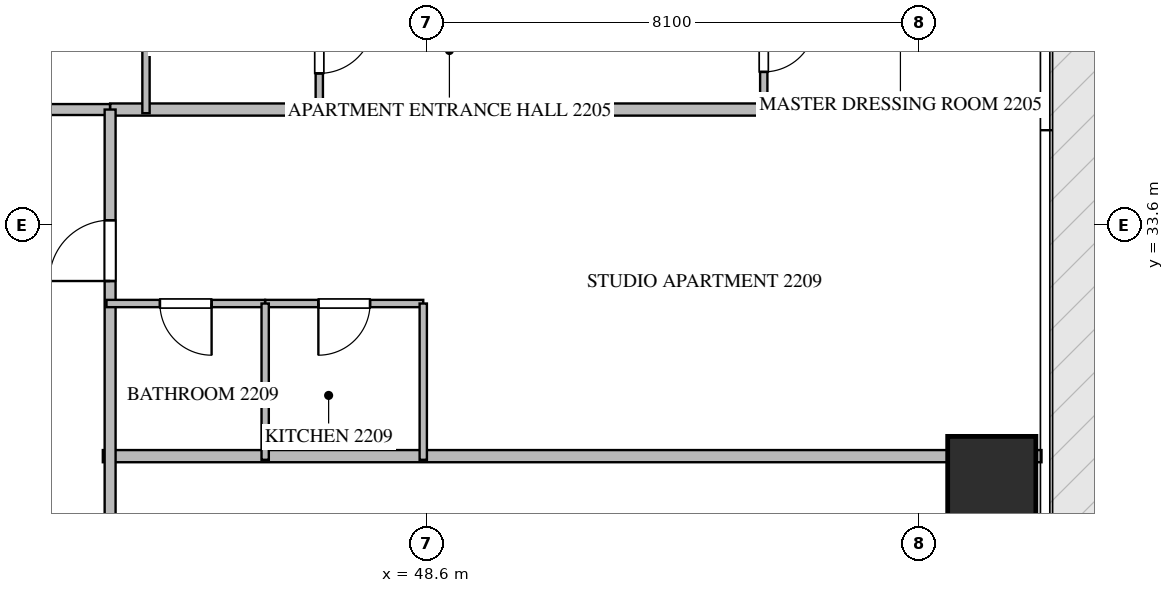
"""IFC4 building model, lengths in metres.
Left out: names, types, materials, properties, quantities, classifications, styles, units other than length and angle.
Written with IfcOpenShell. Run it as: python <this file> out.ifc"""

import sys

from ifc_helpers import new_model, si_unit, direction, frame, frame_2d, origin, origin_2d, place, context, subcontext, project, spatial, rectangle, extrude, source, transform, mapped, element, fill, save


model = new_model("IFC4")
c1 = context("Model", 3, precision=1e-05, world=origin(), true_north=direction((0.0, 1.0)))
c2 = subcontext(c1, "Body", "Model", "MODEL_VIEW")
j1 = project(units=[si_unit("LENGTHUNIT", "METRE"), si_unit("PLANEANGLEUNIT", "RADIAN")], contexts=[c1])
p1 = place(None, origin())
s1 = spatial("IfcSite", under=j1, at=p1, CompositionType="ELEMENT")
p2 = place(p1, origin())
s2 = spatial("IfcBuilding", under=s1, at=p2, CompositionType="ELEMENT")
p3 = place(p2, frame((0.0, 0.0, 90.45)))
s3 = spatial("IfcBuildingStorey", under=s2, at=p3, CompositionType="ELEMENT", Elevation=90.45)
m1 = source(origin(), c2, "Body", "SweptSolid", [
    extrude(rectangle(XDim=1.45, YDim=1.45, at=origin_2d()), origin(), (0.0, 0.0, 1.0), 3.75),
])
p4 = place(p3, frame((57.9, 29.4, -0.26), z_axis=(0.0, 0.0, 1.0), x_axis=(1.0, 0.0, 0.0)))
e1 = element("IfcColumn", 1, at=p4, inside=s3, PredefinedType="COLUMN", context=c2, shape_type="MappedRepresentation", body=[
    mapped(m1, transform((0.0, 0.0, 0.0), scale=1.0)),
])
p5 = place(p3, frame((43.28, 29.8, 0.0), z_axis=(0.0, 0.0, 1.0), x_axis=(1.0, 0.0, 0.0)))
e2 = element("IfcWall", 2, at=p5, inside=s3, PredefinedType="PARTITIONING", context=c2, shape_type="SweptSolid", body=[
    extrude(rectangle(XDim=15.438, YDim=0.2, at=frame_2d((7.719, 0.0))), origin(), (0.0, 0.0, 1.0), 3.49),
])
p6 = place(p3, frame((43.4, 35.5, 0.0), z_axis=(0.0, 0.0, 1.0), x_axis=(1.0, 0.0, 0.0)))
e3 = element("IfcWall", 3, at=p6, inside=s3, PredefinedType="PARTITIONING", context=c2, shape_type="SweptSolid", body=[
    extrude(rectangle(XDim=15.318, YDim=0.2, at=frame_2d((7.659, 0.0))), origin(), (0.0, 0.0, 1.0), 3.49),
])
p7 = place(p3, frame((21.402, 35.5, 0.0), z_axis=(0.0, 0.0, 1.0), x_axis=(1.0, 0.0, 0.0)))
e4 = element("IfcWall", 4, at=p7, inside=s3, PredefinedType="PARTITIONING", context=c2, shape_type="SweptSolid", body=[
    extrude(rectangle(XDim=21.996, YDim=0.18, at=frame_2d((10.998, 0.0))), origin(), (0.0, 0.0, 1.0), 3.49),
])
p8 = place(p7, frame((1.96, 0.0, 0.0)))
e5 = element("IfcOpeningElement", 5, at=p8, cuts=e4, PredefinedType="OPENING", context=c2, shape_type="SweptSolid", body=[
    extrude(rectangle(XDim=1.0, YDim=2.15, at=frame_2d((0.5, 1.075))), frame((0.0, 0.1, 0.0), z_axis=(0.0, -1.0, 0.0), x_axis=(1.0, 0.0, 0.0)), (0.0, 0.0, 1.0), 0.2),
])
p9 = place(p7, frame((5.249, 0.0, 0.0)))
e6 = element("IfcOpeningElement", 6, at=p9, cuts=e4, PredefinedType="OPENING", context=c2, shape_type="SweptSolid", body=[
    extrude(rectangle(XDim=1.0, YDim=2.15, at=frame_2d((0.5, 1.075))), frame((0.0, 0.1, 0.0), z_axis=(0.0, -1.0, 0.0), x_axis=(1.0, 0.0, 0.0)), (0.0, 0.0, 1.0), 0.2),
])
p10 = place(p7, frame((11.653, 0.0, 0.0)))
e7 = element("IfcOpeningElement", 7, at=p10, cuts=e4, PredefinedType="OPENING", context=c2, shape_type="SweptSolid", body=[
    extrude(rectangle(XDim=1.0, YDim=2.15, at=frame_2d((0.5, 1.075))), frame((0.0, 0.1, 0.0), z_axis=(0.0, -1.0, 0.0), x_axis=(1.0, 0.0, 0.0)), (0.0, 0.0, 1.0), 0.2),
])
p11 = place(p7, frame((18.896, 0.0, 0.0)))
e8 = element("IfcOpeningElement", 8, at=p11, cuts=e4, PredefinedType="OPENING", context=c2, shape_type="SweptSolid", body=[
    extrude(rectangle(XDim=1.0, YDim=2.15, at=frame_2d((0.5, 1.075))), frame((0.0, 0.1, 0.0), z_axis=(0.0, -1.0, 0.0), x_axis=(1.0, 0.0, 0.0)), (0.0, 0.0, 1.0), 0.2),
])
p12 = place(p3, frame((43.4, 14.9, 0.0), z_axis=(0.0, 0.0, 1.0), x_axis=(0.0, 1.0, 0.0)))
e9 = element("IfcWall", 9, at=p12, inside=s3, PredefinedType="PARTITIONING", context=c2, shape_type="SweptSolid", body=[
    extrude(rectangle(XDim=20.6, YDim=0.18, at=frame_2d((10.3, 0.0))), origin(), (0.0, 0.0, 1.0), 3.49),
])
p13 = place(p12, frame((3.469, 0.0, 0.0)))
e10 = element("IfcOpeningElement", 10, at=p13, cuts=e9, PredefinedType="OPENING", context=c2, shape_type="SweptSolid", body=[
    extrude(rectangle(XDim=1.0, YDim=2.15, at=frame_2d((0.5, 1.075))), frame((0.0, 0.1, 0.0), z_axis=(0.0, -1.0, 0.0), x_axis=(1.0, 0.0, 0.0)), (0.0, 0.0, 1.0), 0.2),
])
p14 = place(p12, frame((11.074, 0.0, 0.0)))
e11 = element("IfcOpeningElement", 11, at=p14, cuts=e9, PredefinedType="OPENING", context=c2, shape_type="SweptSolid", body=[
    extrude(rectangle(XDim=1.0, YDim=2.15, at=frame_2d((0.5, 1.075))), frame((0.0, 0.1, 0.0), z_axis=(0.0, -1.0, 0.0), x_axis=(1.0, 0.0, 0.0)), (0.0, 0.0, 1.0), 0.2),
])
p15 = place(p12, frame((17.78, 0.0, 0.0)))
e12 = element("IfcOpeningElement", 12, at=p15, cuts=e9, PredefinedType="OPENING", context=c2, shape_type="SweptSolid", body=[
    extrude(rectangle(XDim=1.0, YDim=2.15, at=frame_2d((0.5, 1.075))), frame((0.0, 0.1, 0.0), z_axis=(0.0, -1.0, 0.0), x_axis=(1.0, 0.0, 0.0)), (0.0, 0.0, 1.0), 0.2),
])
p16 = place(p3, frame((43.99, 38.25, 0.0), z_axis=(0.0, 0.0, 1.0), x_axis=(0.0, -1.0, 0.0)))
e13 = element("IfcWall", 13, at=p16, inside=s3, PredefinedType="PARTITIONING", context=c2, shape_type="SweptSolid", body=[
    extrude(rectangle(XDim=2.81, YDim=0.12, at=frame_2d((1.405, 0.0))), origin(), (0.0, 0.0, 1.0), 3.49),
])
p17 = place(p3, frame((46.84, 37.65, 0.0), z_axis=(0.0, 0.0, 1.0), x_axis=(0.0, -1.0, 0.0)))
e14 = element("IfcWall", 14, at=p17, inside=s3, PredefinedType="PARTITIONING", context=c2, shape_type="SweptSolid", body=[
    extrude(rectangle(XDim=2.21, YDim=0.12, at=frame_2d((1.105, 0.0))), origin(), (0.0, 0.0, 1.0), 3.49),
])
p18 = place(p17, frame((0.655, 0.0, 0.0)))
e15 = element("IfcOpeningElement", 15, at=p18, cuts=e14, PredefinedType="OPENING", context=c2, shape_type="SweptSolid", body=[
    extrude(rectangle(XDim=0.9, YDim=2.1, at=frame_2d((0.45, 1.05))), frame((0.0, 0.07, 0.0), z_axis=(0.0, -1.0, 0.0), x_axis=(1.0, 0.0, 0.0)), (0.0, 0.0, 1.0), 0.14),
])
p19 = place(p3, frame((54.15, 37.648, 0.0), z_axis=(0.0, 0.0, 1.0), x_axis=(0.0, -1.0, 0.0)))
e16 = element("IfcWall", 16, at=p19, inside=s3, PredefinedType="PARTITIONING", context=c2, shape_type="SweptSolid", body=[
    extrude(rectangle(XDim=2.208, YDim=0.12, at=frame_2d((1.104, 0.0))), origin(), (0.0, 0.0, 1.0), 3.49),
])
p20 = place(p19, frame((0.679, 0.0, 0.0)))
e17 = element("IfcOpeningElement", 17, at=p20, cuts=e16, PredefinedType="OPENING", context=c2, shape_type="SweptSolid", body=[
    extrude(rectangle(XDim=0.85, YDim=2.1, at=frame_2d((0.425, 1.05))), frame((0.0, 0.07, 0.0), z_axis=(0.0, -1.0, 0.0), x_axis=(1.0, 0.0, 0.0)), (0.0, 0.0, 1.0), 0.14),
])
p21 = place(p3, frame((48.55, 32.31, 0.0), z_axis=(0.0, 0.0, 1.0), x_axis=(-1.0, 0.0, 0.0)))
e18 = element("IfcWall", 18, at=p21, inside=s3, PredefinedType="PARTITIONING", context=c2, shape_type="SweptSolid", body=[
    extrude(rectangle(XDim=2.6, YDim=0.12, at=frame_2d((1.3, 0.0))), origin(), (0.0, 0.0, 1.0), 3.49),
])
p22 = place(p21, frame((0.875, 0.0, 0.0)))
e19 = element("IfcOpeningElement", 19, at=p22, cuts=e18, PredefinedType="OPENING", context=c2, shape_type="SweptSolid", body=[
    extrude(rectangle(XDim=0.85, YDim=2.1, at=frame_2d((0.425, 1.05))), frame((0.0, 0.07, 0.0), z_axis=(0.0, -1.0, 0.0), x_axis=(1.0, 0.0, 0.0)), (0.0, 0.0, 1.0), 0.14),
])
p23 = place(p3, frame((45.948, 32.31, 0.0), z_axis=(0.0, 0.0, 1.0), x_axis=(-1.0, 0.0, 0.0)))
e20 = element("IfcWall", 20, at=p23, inside=s3, PredefinedType="PARTITIONING", context=c2, shape_type="SweptSolid", body=[
    extrude(rectangle(XDim=2.608, YDim=0.12, at=frame_2d((1.304, 0.0))), origin(), (0.0, 0.0, 1.0), 3.49),
])
p24 = place(p23, frame((0.879, 0.0, 0.0)))
e21 = element("IfcOpeningElement", 21, at=p24, cuts=e20, PredefinedType="OPENING", context=c2, shape_type="SweptSolid", body=[
    extrude(rectangle(XDim=0.85, YDim=2.1, at=frame_2d((0.425, 1.05))), frame((0.0, 0.07, 0.0), z_axis=(0.0, -1.0, 0.0), x_axis=(1.0, 0.0, 0.0)), (0.0, 0.0, 1.0), 0.14),
])
for number, where, z_axis, x_axis in (
    (22, (45.95, 29.74, 0.0), (0.0, 0.0, 1.0), (0.0, 1.0, 0.0)),
    (23, (48.55, 29.74, 0.0), (0.0, 0.0, 1.0), (0.0, 1.0, 0.0)),
):
    element("IfcWall", number, at=place(p3, frame(where, z_axis=z_axis, x_axis=x_axis)), inside=s3, PredefinedType="PARTITIONING", context=c2, shape_type="SweptSolid", body=[
        extrude(rectangle(XDim=2.57, YDim=0.12, at=frame_2d((1.285, 0.0))), origin(), (0.0, 0.0, 1.0), 3.49),
    ])
m2 = source(origin(), c2, "Body", "SweptSolid", [
    extrude(rectangle(XDim=1.0, YDim=2.15, at=frame_2d((0.5, 1.075))), frame((0.0, 0.025, 0.0), z_axis=(0.0, -1.0, 0.0), x_axis=(1.0, 0.0, 0.0)), (0.0, 0.0, 1.0), 0.05),
])
p25 = place(p15, origin())
e24 = element("IfcDoor", 24, at=p25, inside=s3, OperationType="SINGLE_SWING_LEFT", PredefinedType="DOOR", context=c2, shape_type="MappedRepresentation", body=[
    mapped(m2, transform((0.0, 0.0, 0.0), scale=1.0)),
])
fill(e12, e24)
m3 = source(origin(), c2, "Body", "SweptSolid", [
    extrude(rectangle(XDim=0.9, YDim=2.1, at=frame_2d((0.45, 1.05))), frame((0.0, 0.025, 0.0), z_axis=(0.0, -1.0, 0.0), x_axis=(1.0, 0.0, 0.0)), (0.0, 0.0, 1.0), 0.05),
])
p26 = place(p18, origin())
e25 = element("IfcDoor", 25, at=p26, inside=s3, OperationType="SINGLE_SWING_LEFT", PredefinedType="DOOR", context=c2, shape_type="MappedRepresentation", body=[
    mapped(m3, transform((0.0, 0.0, 0.0), scale=1.0)),
])
fill(e15, e25)
m4 = source(origin(), c2, "Body", "SweptSolid", [
    extrude(rectangle(XDim=0.85, YDim=2.1, at=frame_2d((0.425, 1.05))), frame((0.0, 0.025, 0.0), z_axis=(0.0, -1.0, 0.0), x_axis=(1.0, 0.0, 0.0)), (0.0, 0.0, 1.0), 0.05),
])
p27 = place(p20, origin())
e26 = element("IfcDoor", 26, at=p27, inside=s3, OperationType="SINGLE_SWING_LEFT", PredefinedType="DOOR", context=c2, shape_type="MappedRepresentation", body=[
    mapped(m4, transform((0.0, 0.0, 0.0), scale=1.0)),
])
fill(e17, e26)
p28 = place(p22, origin())
e27 = element("IfcDoor", 27, at=p28, inside=s3, OperationType="SINGLE_SWING_RIGHT", PredefinedType="DOOR", context=c2, shape_type="MappedRepresentation", body=[
    mapped(m4, transform((0.0, 0.0, 0.0), scale=1.0)),
])
fill(e19, e27)
p29 = place(p24, origin())
e28 = element("IfcDoor", 28, at=p29, inside=s3, OperationType="SINGLE_SWING_LEFT", PredefinedType="DOOR", context=c2, shape_type="MappedRepresentation", body=[
    mapped(m4, transform((0.0, 0.0, 0.0), scale=1.0)),
])
fill(e21, e28)
save(model, sys.argv[1])
